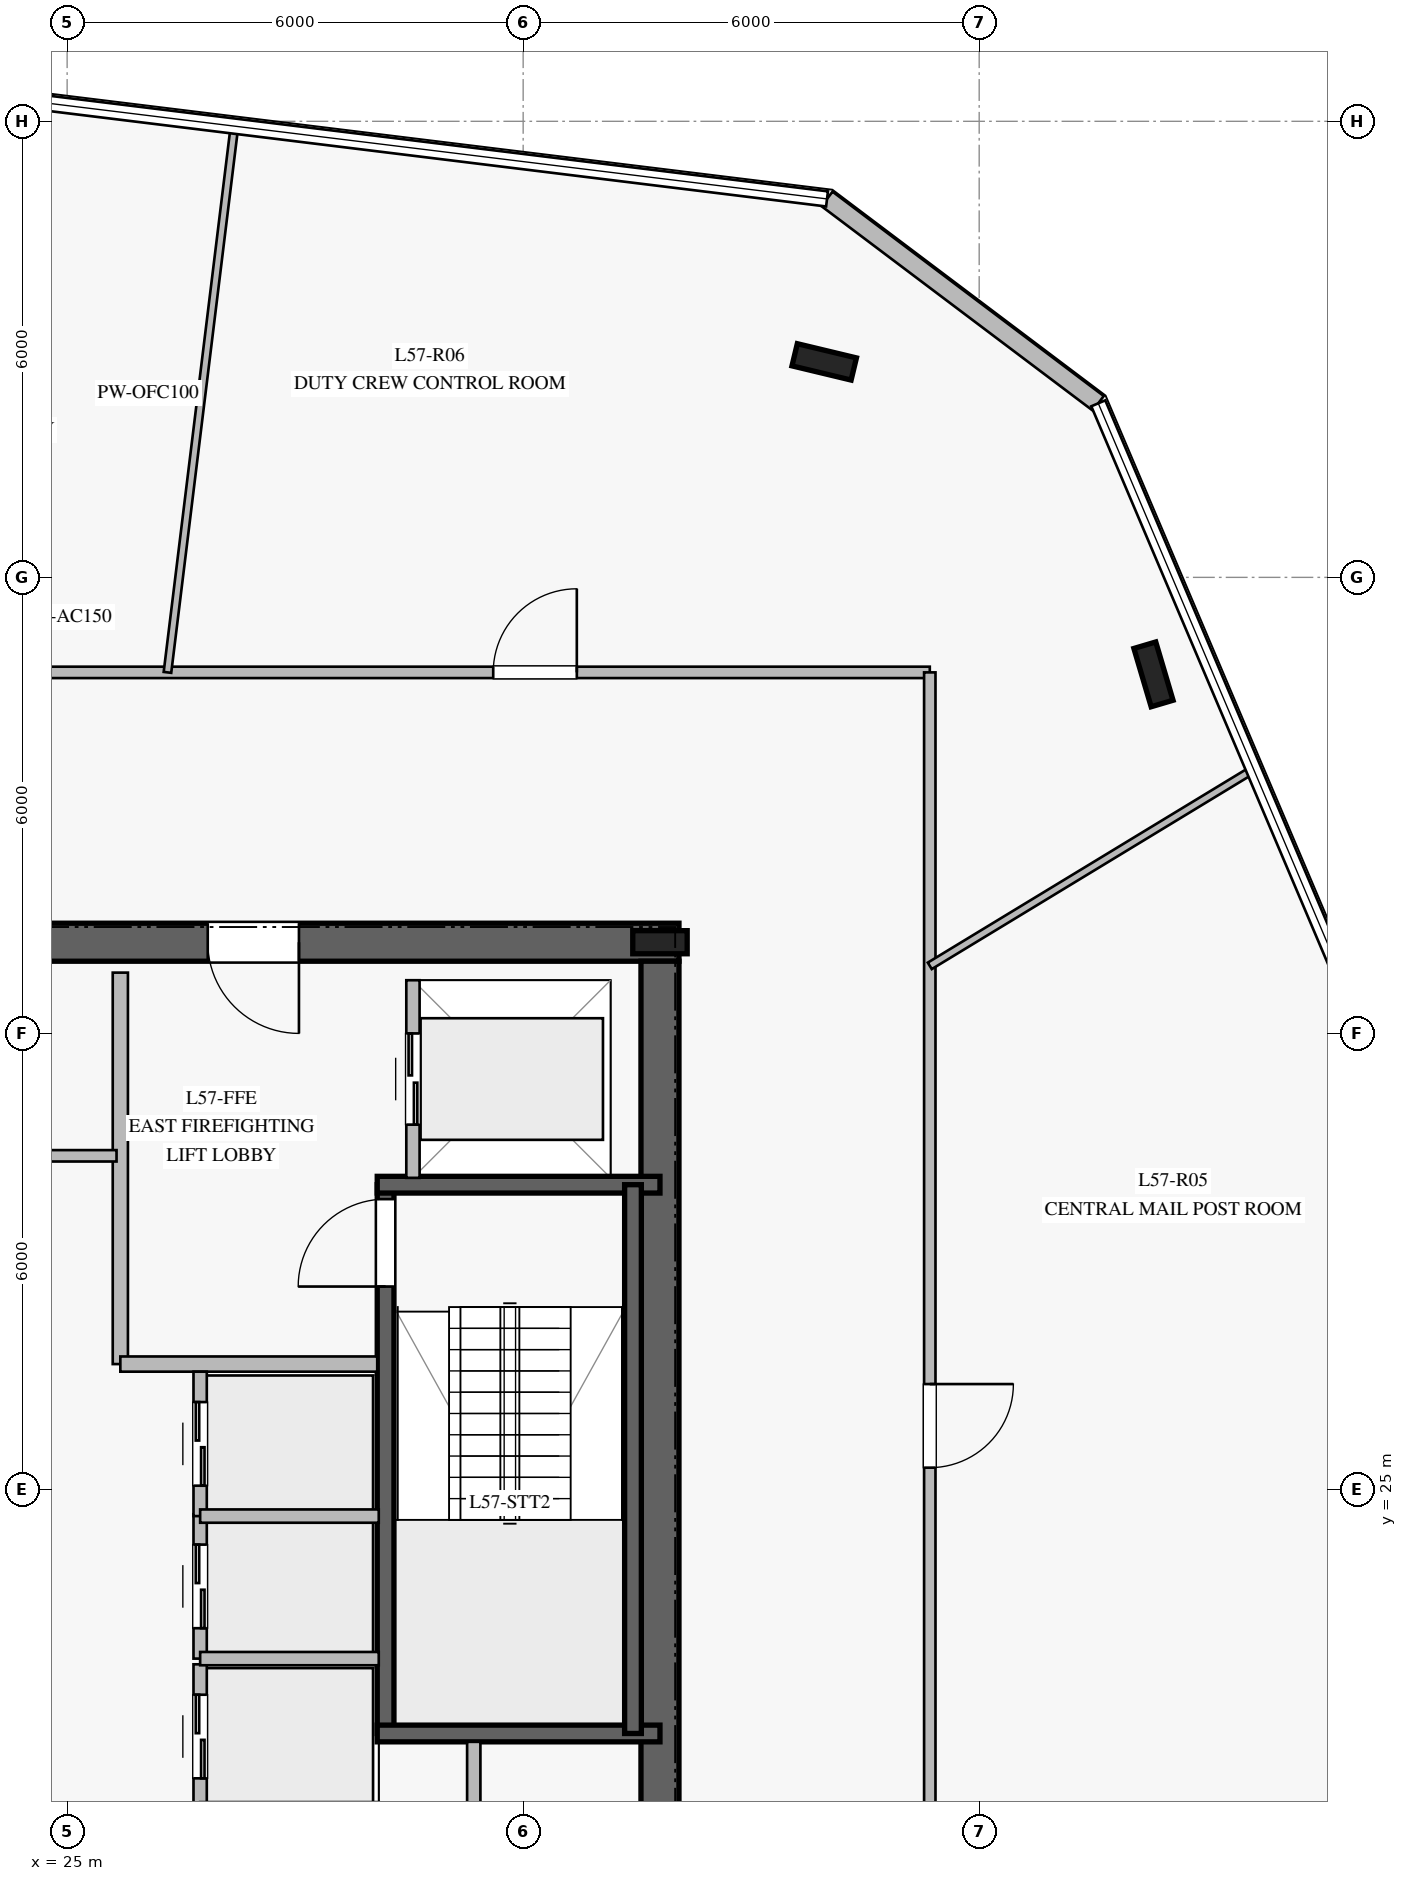
"""IFC4 building model, lengths in metres.
Left out: names, types, materials, properties, quantities, classifications, styles, units other than length and angle.
Written with IfcOpenShell. Run it as: python <this file> out.ifc"""

import sys

from ifc_helpers import new_model, si_unit, direction, frame, frame_2d, origin, origin_2d, place, context, subcontext, project, spatial, rectangle, i_section, extrude, element, fill, save


model = new_model("IFC4")
c1 = context("Model", 3, precision=1e-05, world=origin(), true_north=direction((0.0, 1.0)))
c2 = subcontext(c1, "Body", "Model", "MODEL_VIEW")
j1 = project(units=[si_unit("LENGTHUNIT", "METRE"), si_unit("PLANEANGLEUNIT", "RADIAN")], contexts=[c1])
p1 = place(None, origin())
s1 = spatial("IfcSite", under=j1, at=p1, CompositionType="ELEMENT")
p2 = place(p1, origin())
s2 = spatial("IfcBuilding", under=s1, at=p2, CompositionType="ELEMENT")
p3 = place(p2, frame((0.0, 0.0, 236.8)))
s3 = spatial("IfcBuildingStorey", under=s2, at=p3, CompositionType="ELEMENT", Elevation=236.8)
p4 = place(p3, frame((33.05, 32.2, 0.0), z_axis=(0.0, 0.0, 1.0), x_axis=(-1.0, 0.0, 0.0)))
e1 = element("IfcWall", 1, at=p4, inside=s3, PredefinedType="SHEAR", context=c2, shape_type="SweptSolid", body=[
    extrude(rectangle(XDim=16.1, YDim=0.5, at=frame_2d((8.05, 0.0))), origin(), (0.0, 0.0, 1.0), 3.78),
])
p5 = place(p4, frame((5.0, 0.0, 0.0)))
e2 = element("IfcOpeningElement", 2, at=p5, cuts=e1, PredefinedType="OPENING", context=c2, shape_type="SweptSolid", body=[
    extrude(rectangle(XDim=1.2, YDim=2.25, at=frame_2d((0.6, 1.125))), frame((0.0, 0.26, 0.0), z_axis=(0.0, -1.0, 0.0), x_axis=(1.0, 0.0, 0.0)), (0.0, 0.0, 1.0), 0.52),
])
p6 = place(p4, frame((9.825, 0.0, 0.0)))
e3 = element("IfcOpeningElement", 3, at=p6, cuts=e1, PredefinedType="OPENING", context=c2, shape_type="SweptSolid", body=[
    extrude(rectangle(XDim=1.1, YDim=2.2, at=frame_2d((0.55, 1.1))), frame((0.0, 0.26, 0.0), z_axis=(0.0, -1.0, 0.0), x_axis=(1.0, 0.0, 0.0)), (0.0, 0.0, 1.0), 0.52),
])
p7 = place(p3, frame((32.8, 18.05, 0.0), z_axis=(0.0, 0.0, 1.0), x_axis=(0.0, 1.0, 0.0)))
e4 = element("IfcWall", 4, at=p7, inside=s3, PredefinedType="SHEAR", context=c2, shape_type="SweptSolid", body=[
    extrude(rectangle(XDim=13.9, YDim=0.5, at=frame_2d((6.95, 0.0))), origin(), (0.0, 0.0, 1.0), 3.78),
])
p8 = place(p3, frame((32.8, 32.2, 0.0), z_axis=(0.0, 0.0, 1.0), x_axis=(1.0, 0.0, 0.0)))
e5 = element("IfcColumn", 5, at=p8, inside=s3, PredefinedType="COLUMN", context=c2, shape_type="SweptSolid", body=[
    extrude(i_section(OverallWidth=0.304, OverallDepth=0.716, WebThickness=0.021, FlangeThickness=0.04, at=origin_2d()), origin(), (0.0, 0.0, 1.0), 4.0),
])
p9 = place(p3, frame((29.19, 21.79, 0.0), z_axis=(0.0, 0.0, 1.0), x_axis=(0.0, 1.0, 0.0)))
e6 = element("IfcWall", 6, at=p9, inside=s3, PredefinedType="SOLIDWALL", context=c2, shape_type="SweptSolid", body=[
    extrude(rectangle(XDim=7.22, YDim=0.22, at=frame_2d((3.61, 0.0))), origin(), (0.0, 0.0, 1.0), 3.78),
])
p10 = place(p9, frame((5.88, 0.0, 0.0)))
e7 = element("IfcOpeningElement", 7, at=p10, cuts=e6, PredefinedType="OPENING", context=c2, shape_type="SweptSolid", body=[
    extrude(rectangle(XDim=1.15, YDim=2.2, at=frame_2d((0.575, 1.1))), frame((0.0, 0.12, 0.0), z_axis=(0.0, -1.0, 0.0), x_axis=(1.0, 0.0, 0.0)), (0.0, 0.0, 1.0), 0.24),
])
for number, where, z_axis, x_axis in (
    (8, (29.08, 21.79, 0.0), (0.0, 0.0, 1.0), (1.0, 0.0, 0.0)),
    (9, (29.08, 29.01, 0.0), (0.0, 0.0, 1.0), (1.0, 0.0, 0.0)),
):
    element("IfcWall", number, at=place(p3, frame(where, z_axis=z_axis, x_axis=x_axis)), inside=s3, PredefinedType="SOLIDWALL", context=c2, shape_type="SweptSolid", body=[
        extrude(rectangle(XDim=3.72, YDim=0.22, at=frame_2d((1.86, 0.0))), origin(), (0.0, 0.0, 1.0), 3.78),
    ])
p11 = place(p3, frame((32.445, 29.01, 0.0), z_axis=(0.0, 0.0, 1.0), x_axis=(0.0, -1.0, 0.0)))
e10 = element("IfcWall", 10, at=p11, inside=s3, PredefinedType="SOLIDWALL", context=c2, shape_type="SweptSolid", body=[
    extrude(rectangle(XDim=7.22, YDim=0.22, at=frame_2d((3.61, 0.0))), origin(), (0.0, 0.0, 1.0), 3.78),
])
for number, where, z_axis, x_axis in (
    (11, (34.961, 39.835, 0.0), (0.0, 0.0, 1.0), (-0.972, 0.233, 0.0)),
    (12, (39.293, 35.724, 0.0), (0.0, 0.0, 1.0), (-0.284, 0.959, 0.0)),
):
    element("IfcColumn", number, at=place(p3, frame(where, z_axis=z_axis, x_axis=x_axis)), inside=s3, PredefinedType="COLUMN", context=c2, shape_type="SweptSolid", body=[
        extrude(i_section(OverallWidth=0.3, OverallDepth=0.8, WebThickness=0.018, FlangeThickness=0.033, at=origin_2d()), origin(), (0.0, 0.0, 1.0), 4.0),
    ])
p12 = place(p3, frame((38.567, 39.29, 0.0), z_axis=(0.0, 0.0, 1.0), x_axis=(-0.798673666817, 0.601764384069, 0.0)))
e13 = element("IfcWall", 13, at=p12, inside=s3, PredefinedType="STANDARD", context=c2, shape_type="SweptSolid", body=[
    extrude(rectangle(XDim=4.469, YDim=0.24, at=frame_2d((2.234, 0.0))), origin(), (0.0, 0.0, 1.0), 3.78),
])
p13 = place(p3, frame((25.7, 26.65, 0.0), z_axis=(0.0, 0.0, 1.0), x_axis=(0.0, 1.0, 0.0)))
e14 = element("IfcWall", 14, at=p13, inside=s3, PredefinedType="PARTITIONING", context=c2, shape_type="SweptSolid", body=[
    extrude(rectangle(XDim=5.15, YDim=0.2, at=frame_2d((2.575, 0.0))), origin(), (0.0, 0.0, 1.0), 3.78),
])
p14 = place(p3, frame((25.7, 26.65, 0.0), z_axis=(0.0, 0.0, 1.0), x_axis=(1.0, 0.0, 0.0)))
e15 = element("IfcWall", 15, at=p14, inside=s3, PredefinedType="PARTITIONING", context=c2, shape_type="SweptSolid", body=[
    extrude(rectangle(XDim=3.38, YDim=0.2, at=frame_2d((1.69, 0.0))), origin(), (0.0, 0.0, 1.0), 3.78),
])
p15 = place(p3, frame((30.35, 18.2, 0.0), z_axis=(0.0, 0.0, 1.0), x_axis=(0.0, 1.0, 0.0)))
e16 = element("IfcWall", 16, at=p15, inside=s3, PredefinedType="PARTITIONING", context=c2, shape_type="SweptSolid", body=[
    extrude(rectangle(XDim=3.48, YDim=0.175, at=frame_2d((1.74, 0.0))), origin(), (0.0, 0.0, 1.0), 3.78),
])
p16 = place(p3, frame((19.75, 29.39, 0.0), z_axis=(0.0, 0.0, 1.0), x_axis=(1.0, 0.0, 0.0)))
e17 = element("IfcWall", 17, at=p16, inside=s3, PredefinedType="PARTITIONING", context=c2, shape_type="SweptSolid", body=[
    extrude(rectangle(XDim=5.9, YDim=0.15, at=frame_2d((2.95, 0.0))), origin(), (0.0, 0.0, 1.0), 3.78),
])
p17 = place(p3, frame((26.75, 20.8, 0.0), z_axis=(0.0, 0.0, 1.0), x_axis=(0.0, 1.0, 0.0)))
e18 = element("IfcWall", 18, at=p17, inside=s3, PredefinedType="PARTITIONING", context=c2, shape_type="SweptSolid", body=[
    extrude(rectangle(XDim=1.9, YDim=0.175, at=frame_2d((0.95, 0.0))), origin(), (0.0, 0.0, 1.0), 3.78),
])
p18 = place(p17, frame((0.4, 0.0, 0.0)))
e19 = element("IfcOpeningElement", 19, at=p18, cuts=e18, PredefinedType="OPENING", context=c2, shape_type="SweptSolid", body=[
    extrude(rectangle(XDim=1.1, YDim=2.2, at=frame_2d((0.55, 1.1))), frame((0.0, 0.098, 0.0), z_axis=(0.0, -1.0, 0.0), x_axis=(1.0, 0.0, 0.0)), (0.0, 0.0, 1.0), 0.195),
])
p19 = place(p3, frame((26.75, 22.775, 0.0), z_axis=(0.0, 0.0, 1.0), x_axis=(0.0, 1.0, 0.0)))
e20 = element("IfcWall", 20, at=p19, inside=s3, PredefinedType="PARTITIONING", context=c2, shape_type="SweptSolid", body=[
    extrude(rectangle(XDim=1.9, YDim=0.175, at=frame_2d((0.95, 0.0))), origin(), (0.0, 0.0, 1.0), 3.78),
])
p20 = place(p19, frame((0.4, 0.0, 0.0)))
e21 = element("IfcOpeningElement", 21, at=p20, cuts=e20, PredefinedType="OPENING", context=c2, shape_type="SweptSolid", body=[
    extrude(rectangle(XDim=1.1, YDim=2.2, at=frame_2d((0.55, 1.1))), frame((0.0, 0.098, 0.0), z_axis=(0.0, -1.0, 0.0), x_axis=(1.0, 0.0, 0.0)), (0.0, 0.0, 1.0), 0.195),
])
p21 = place(p3, frame((26.75, 22.775, 0.0), z_axis=(0.0, 0.0, 1.0), x_axis=(1.0, 0.0, 0.0)))
e22 = element("IfcWall", 22, at=p21, inside=s3, PredefinedType="PARTITIONING", context=c2, shape_type="SweptSolid", body=[
    extrude(rectangle(XDim=2.35, YDim=0.175, at=frame_2d((1.175, 0.0))), origin(), (0.0, 0.0, 1.0), 3.78),
])
p22 = place(p3, frame((26.75, 24.65, 0.0), z_axis=(0.0, 0.0, 1.0), x_axis=(0.0, 1.0, 0.0)))
e23 = element("IfcWall", 23, at=p22, inside=s3, PredefinedType="PARTITIONING", context=c2, shape_type="SweptSolid", body=[
    extrude(rectangle(XDim=1.9, YDim=0.175, at=frame_2d((0.95, 0.0))), origin(), (0.0, 0.0, 1.0), 3.78),
])
p23 = place(p22, frame((0.4, 0.0, 0.0)))
e24 = element("IfcOpeningElement", 24, at=p23, cuts=e23, PredefinedType="OPENING", context=c2, shape_type="SweptSolid", body=[
    extrude(rectangle(XDim=1.1, YDim=2.2, at=frame_2d((0.55, 1.1))), frame((0.0, 0.098, 0.0), z_axis=(0.0, -1.0, 0.0), x_axis=(1.0, 0.0, 0.0)), (0.0, 0.0, 1.0), 0.195),
])
p24 = place(p3, frame((26.75, 24.65, 0.0), z_axis=(0.0, 0.0, 1.0), x_axis=(1.0, 0.0, 0.0)))
e25 = element("IfcWall", 25, at=p24, inside=s3, PredefinedType="PARTITIONING", context=c2, shape_type="SweptSolid", body=[
    extrude(rectangle(XDim=2.35, YDim=0.175, at=frame_2d((1.175, 0.0))), origin(), (0.0, 0.0, 1.0), 3.78),
])
p25 = place(p3, frame((29.55, 29.1, 0.0), z_axis=(0.0, 0.0, 1.0), x_axis=(0.0, 1.0, 0.0)))
e26 = element("IfcWall", 26, at=p25, inside=s3, PredefinedType="PARTITIONING", context=c2, shape_type="SweptSolid", body=[
    extrude(rectangle(XDim=2.6, YDim=0.175, at=frame_2d((1.3, 0.0))), origin(), (0.0, 0.0, 1.0), 3.78),
])
p26 = place(p25, frame((0.7, 0.0, 0.0)))
e27 = element("IfcOpeningElement", 27, at=p26, cuts=e26, PredefinedType="OPENING", context=c2, shape_type="SweptSolid", body=[
    extrude(rectangle(XDim=1.2, YDim=2.2, at=frame_2d((0.6, 1.1))), frame((0.0, 0.098, 0.0), z_axis=(0.0, -1.0, 0.0), x_axis=(1.0, 0.0, 0.0)), (0.0, 0.0, 1.0), 0.195),
])
p27 = place(p3, frame((13.65, 35.75, 0.0), z_axis=(0.0, 0.0, 1.0), x_axis=(1.0, 0.0, 0.0)))
e28 = element("IfcWall", 28, at=p27, inside=s3, PredefinedType="PARTITIONING", context=c2, shape_type="SweptSolid", body=[
    extrude(rectangle(XDim=22.7, YDim=0.15, at=frame_2d((11.35, 0.0))), origin(), (0.0, 0.0, 1.0), 3.05),
])
p28 = place(p27, frame((16.956, 0.0, 0.0)))
e29 = element("IfcOpeningElement", 29, at=p28, cuts=e28, PredefinedType="OPENING", context=c2, shape_type="SweptSolid", body=[
    extrude(rectangle(XDim=1.1, YDim=2.2, at=frame_2d((0.55, 1.1))), frame((0.0, 0.085, 0.0), z_axis=(0.0, -1.0, 0.0), x_axis=(1.0, 0.0, 0.0)), (0.0, 0.0, 1.0), 0.17),
])
p29 = place(p27, frame((6.796, 0.0, 0.0)))
e30 = element("IfcOpeningElement", 30, at=p29, cuts=e28, PredefinedType="OPENING", context=c2, shape_type="SweptSolid", body=[
    extrude(rectangle(XDim=1.1, YDim=2.2, at=frame_2d((0.55, 1.1))), frame((0.0, 0.085, 0.0), z_axis=(0.0, -1.0, 0.0), x_axis=(1.0, 0.0, 0.0)), (0.0, 0.0, 1.0), 0.17),
])
p30 = place(p3, frame((36.35, 35.75, 0.0), z_axis=(0.0, 0.0, 1.0), x_axis=(0.0, -1.0, 0.0)))
e31 = element("IfcWall", 31, at=p30, inside=s3, PredefinedType="PARTITIONING", context=c2, shape_type="SweptSolid", body=[
    extrude(rectangle(XDim=21.5, YDim=0.15, at=frame_2d((10.75, 0.0))), origin(), (0.0, 0.0, 1.0), 3.02),
])
p31 = place(p30, frame((17.936, 0.0, 0.0)))
e32 = element("IfcOpeningElement", 32, at=p31, cuts=e31, PredefinedType="OPENING", context=c2, shape_type="SweptSolid", body=[
    extrude(rectangle(XDim=1.1, YDim=2.2, at=frame_2d((0.55, 1.1))), frame((0.0, 0.085, 0.0), z_axis=(0.0, -1.0, 0.0), x_axis=(1.0, 0.0, 0.0)), (0.0, 0.0, 1.0), 0.17),
])
p32 = place(p30, frame((9.363, 0.0, 0.0)))
e33 = element("IfcOpeningElement", 33, at=p32, cuts=e31, PredefinedType="OPENING", context=c2, shape_type="SweptSolid", body=[
    extrude(rectangle(XDim=1.1, YDim=2.2, at=frame_2d((0.55, 1.1))), frame((0.0, 0.085, 0.0), z_axis=(0.0, -1.0, 0.0), x_axis=(1.0, 0.0, 0.0)), (0.0, 0.0, 1.0), 0.17),
])
p33 = place(p3, frame((26.32, 35.75, 0.0), z_axis=(0.0, 0.0, 1.0), x_axis=(0.121804850919, 0.992554068196, 0.0)))
e34 = element("IfcWall", 34, at=p33, inside=s3, PredefinedType="MOVABLE", context=c2, shape_type="SweptSolid", body=[
    extrude(rectangle(XDim=7.224, YDim=0.1, at=frame_2d((3.612, 0.0))), origin(), (0.0, 0.0, 1.0), 3.05),
])
p34 = place(p3, frame((36.35, 31.889, 0.0), z_axis=(0.0, 0.0, 1.0), x_axis=(0.854761817099, 0.5190204582, 0.0)))
e35 = element("IfcWall", 35, at=p34, inside=s3, PredefinedType="MOVABLE", context=c2, shape_type="SweptSolid", body=[
    extrude(rectangle(XDim=4.967, YDim=0.1, at=frame_2d((2.484, 0.0))), origin(), (0.0, 0.0, 1.0), 3.18),
])
p35 = place(p10, origin())
e36 = element("IfcDoor", 36, at=p35, inside=s3, OperationType="SINGLE_SWING_LEFT", PredefinedType="DOOR", context=c2, shape_type="SweptSolid", body=[
    extrude(rectangle(XDim=1.15, YDim=2.2, at=frame_2d((0.575, 1.1))), frame((0.0, 0.025, 0.0), z_axis=(0.0, -1.0, 0.0), x_axis=(1.0, 0.0, 0.0)), (0.0, 0.0, 1.0), 0.05),
])
fill(e7, e36)
p36 = place(p5, origin())
e37 = element("IfcDoor", 37, at=p36, inside=s3, OperationType="SINGLE_SWING_LEFT", PredefinedType="DOOR", context=c2, shape_type="SweptSolid", body=[
    extrude(rectangle(XDim=1.2, YDim=2.25, at=frame_2d((0.6, 1.125))), frame((0.0, 0.025, 0.0), z_axis=(0.0, -1.0, 0.0), x_axis=(1.0, 0.0, 0.0)), (0.0, 0.0, 1.0), 0.05),
])
fill(e2, e37)
p37 = place(p18, origin())
e38 = element("IfcDoor", 38, at=p37, inside=s3, OperationType="DOUBLE_DOOR_SLIDING", PredefinedType="DOOR", context=c2, shape_type="SweptSolid", body=[
    extrude(rectangle(XDim=1.1, YDim=2.2, at=frame_2d((0.55, 1.1))), frame((0.0, 0.025, 0.0), z_axis=(0.0, -1.0, 0.0), x_axis=(1.0, 0.0, 0.0)), (0.0, 0.0, 1.0), 0.05),
])
fill(e19, e38)
p38 = place(p20, origin())
e39 = element("IfcDoor", 39, at=p38, inside=s3, OperationType="DOUBLE_DOOR_SLIDING", PredefinedType="DOOR", context=c2, shape_type="SweptSolid", body=[
    extrude(rectangle(XDim=1.1, YDim=2.2, at=frame_2d((0.55, 1.1))), frame((0.0, 0.025, 0.0), z_axis=(0.0, -1.0, 0.0), x_axis=(1.0, 0.0, 0.0)), (0.0, 0.0, 1.0), 0.05),
])
fill(e21, e39)
p39 = place(p23, origin())
e40 = element("IfcDoor", 40, at=p39, inside=s3, OperationType="DOUBLE_DOOR_SLIDING", PredefinedType="DOOR", context=c2, shape_type="SweptSolid", body=[
    extrude(rectangle(XDim=1.1, YDim=2.2, at=frame_2d((0.55, 1.1))), frame((0.0, 0.025, 0.0), z_axis=(0.0, -1.0, 0.0), x_axis=(1.0, 0.0, 0.0)), (0.0, 0.0, 1.0), 0.05),
])
fill(e24, e40)
p40 = place(p26, origin())
e41 = element("IfcDoor", 41, at=p40, inside=s3, OperationType="DOUBLE_DOOR_SLIDING", PredefinedType="DOOR", context=c2, shape_type="SweptSolid", body=[
    extrude(rectangle(XDim=1.2, YDim=2.2, at=frame_2d((0.6, 1.1))), frame((0.0, 0.025, 0.0), z_axis=(0.0, -1.0, 0.0), x_axis=(1.0, 0.0, 0.0)), (0.0, 0.0, 1.0), 0.05),
])
fill(e27, e41)
p41 = place(p32, origin())
e42 = element("IfcDoor", 42, at=p41, inside=s3, OperationType="SINGLE_SWING_LEFT", PredefinedType="DOOR", context=c2, shape_type="SweptSolid", body=[
    extrude(rectangle(XDim=1.1, YDim=2.2, at=frame_2d((0.55, 1.1))), frame((0.0, 0.025, 0.0), z_axis=(0.0, -1.0, 0.0), x_axis=(1.0, 0.0, 0.0)), (0.0, 0.0, 1.0), 0.05),
])
fill(e33, e42)
p42 = place(p28, origin())
e43 = element("IfcDoor", 43, at=p42, inside=s3, OperationType="SINGLE_SWING_RIGHT", PredefinedType="DOOR", context=c2, shape_type="SweptSolid", body=[
    extrude(rectangle(XDim=1.1, YDim=2.2, at=frame_2d((0.55, 1.1))), frame((0.0, 0.025, 0.0), z_axis=(0.0, -1.0, 0.0), x_axis=(1.0, 0.0, 0.0)), (0.0, 0.0, 1.0), 0.05),
])
fill(e29, e43)
save(model, sys.argv[1])
